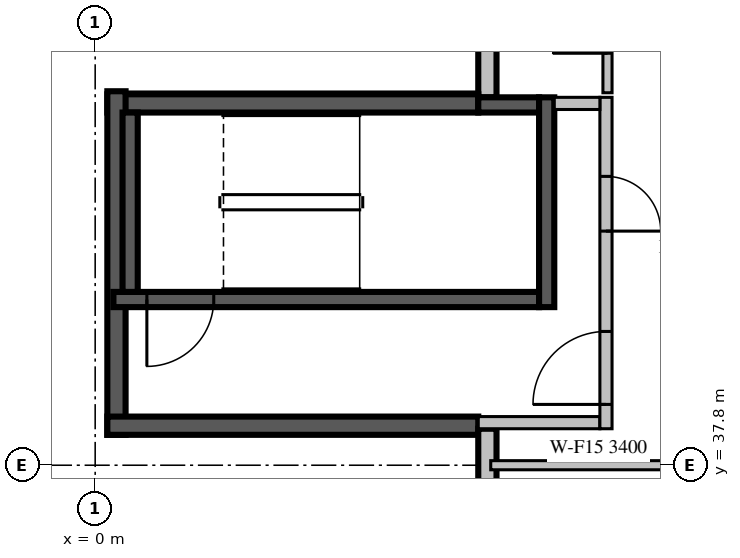
"""IFC4 building model, lengths in metres.
Left out: names, types, materials, properties, quantities, classifications, styles, units other than length and angle.
Written with IfcOpenShell. Run it as: python <this file> out.ifc"""

import sys

from ifc_helpers import new_model, si_unit, direction, frame, frame_2d, origin, place, context, subcontext, project, spatial, rectangle, extrude, source, transform, mapped, element, fill, save


model = new_model("IFC4")
c1 = context("Model", 3, precision=1e-05, world=origin(), true_north=direction((0.0, 1.0)))
c2 = subcontext(c1, "Body", "Model", "MODEL_VIEW")
j1 = project(units=[si_unit("LENGTHUNIT", "METRE"), si_unit("PLANEANGLEUNIT", "RADIAN")], contexts=[c1])
p1 = place(None, origin())
s1 = spatial("IfcSite", under=j1, at=p1, CompositionType="ELEMENT")
p2 = place(p1, origin())
s2 = spatial("IfcBuilding", under=s1, at=p2, CompositionType="ELEMENT")
p3 = place(p2, frame((0.0, 0.0, 200.6)))
s3 = spatial("IfcBuildingStorey", under=s2, at=p3, CompositionType="ELEMENT", Elevation=200.6)
m1 = source(origin(), c2, "Body", "SweptSolid", [
    extrude(rectangle(XDim=9.91, YDim=0.3, at=frame_2d((4.955, 0.0))), origin(), (0.0, 0.0, 1.0), 3.4),
])
p4 = place(p3, frame((6.45, 53.76, 0.0), z_axis=(0.0, 0.0, 1.0), x_axis=(0.0, -1.0, 0.0)))
e1 = element("IfcWall", 1, at=p4, inside=s3, PredefinedType="STANDARD", context=c2, shape_type="MappedRepresentation", body=[
    mapped(m1, transform((0.0, 0.0, 0.0), scale=1.0)),
])
m2 = source(origin(), c2, "Body", "SweptSolid", [
    extrude(rectangle(XDim=2.4, YDim=2.3, at=frame_2d((1.2, 1.15))), frame((0.0, 0.16, 0.0), z_axis=(0.0, -1.0, 0.0), x_axis=(1.0, 0.0, 0.0)), (0.0, 0.0, 1.0), 0.32),
])
p5 = place(p4, frame((4.272, 0.0, 0.6)))
e2 = element("IfcOpeningElement", 2, at=p5, cuts=e1, PredefinedType="OPENING", context=c2, shape_type="MappedRepresentation", body=[
    mapped(m2, transform((0.0, 0.0, 0.0), scale=1.0)),
])
p6 = place(p4, frame((0.936, 0.0, 0.6)))
e3 = element("IfcOpeningElement", 3, at=p6, cuts=e1, PredefinedType="OPENING", context=c2, shape_type="MappedRepresentation", body=[
    mapped(m2, transform((0.0, 0.0, 0.0), scale=1.0)),
])
m3 = source(origin(), c2, "Body", "SweptSolid", [
    extrude(rectangle(XDim=6.1, YDim=0.3, at=frame_2d((3.05, 0.0))), origin(), (0.0, 0.0, 1.0), 3.4),
])
p7 = place(p3, frame((6.3, 43.75, 0.0), z_axis=(0.0, 0.0, 1.0), x_axis=(-1.0, 0.0, 0.0)))
e4 = element("IfcWall", 4, at=p7, inside=s3, PredefinedType="SOLIDWALL", context=c2, shape_type="MappedRepresentation", body=[
    mapped(m3, transform((0.0, 0.0, 0.0), scale=1.0)),
])
m4 = source(origin(), c2, "Body", "SweptSolid", [
    extrude(rectangle(XDim=5.65, YDim=0.3, at=frame_2d((2.825, 0.0))), origin(), (0.0, 0.0, 1.0), 3.4),
])
p8 = place(p3, frame((0.35, 43.95, 0.0), z_axis=(0.0, 0.0, 1.0), x_axis=(0.0, -1.0, 0.0)))
e5 = element("IfcWall", 5, at=p8, inside=s3, PredefinedType="SOLIDWALL", context=c2, shape_type="MappedRepresentation", body=[
    mapped(m4, transform((0.0, 0.0, 0.0), scale=1.0)),
])
p9 = place(p3, frame((0.2, 38.45, 0.0), z_axis=(0.0, 0.0, 1.0), x_axis=(1.0, 0.0, 0.0)))
e6 = element("IfcWall", 6, at=p9, inside=s3, PredefinedType="SOLIDWALL", context=c2, shape_type="MappedRepresentation", body=[
    mapped(m3, transform((0.0, 0.0, 0.0), scale=1.0)),
])
m5 = source(origin(), c2, "Body", "SweptSolid", [
    extrude(rectangle(XDim=16.6, YDim=0.3, at=frame_2d((8.3, 0.0))), origin(), (0.0, 0.0, 1.0), 3.4),
])
p10 = place(p3, frame((6.45, 38.4, 0.0), z_axis=(0.0, 0.0, 1.0), x_axis=(0.0, -1.0, 0.0)))
e7 = element("IfcWall", 7, at=p10, inside=s3, PredefinedType="STANDARD", context=c2, shape_type="MappedRepresentation", body=[
    mapped(m5, transform((0.0, 0.0, 0.0), scale=1.0)),
])
m6 = source(origin(), c2, "Body", "SweptSolid", [
    extrude(rectangle(XDim=1.8, YDim=2.3, at=frame_2d((0.9, 1.15))), frame((0.0, 0.16, 0.0), z_axis=(0.0, -1.0, 0.0), x_axis=(1.0, 0.0, 0.0)), (0.0, 0.0, 1.0), 0.32),
])
p11 = place(p10, frame((1.15, 0.0, 0.6)))
e8 = element("IfcOpeningElement", 8, at=p11, cuts=e7, PredefinedType="OPENING", context=c2, shape_type="MappedRepresentation", body=[
    mapped(m6, transform((0.0, 0.0, 0.0), scale=1.0)),
])
p12 = place(p10, frame((9.438, 0.0, 0.6)))
e9 = element("IfcOpeningElement", 9, at=p12, cuts=e7, PredefinedType="OPENING", context=c2, shape_type="MappedRepresentation", body=[
    mapped(m6, transform((0.0, 0.0, 0.0), scale=1.0)),
])
m7 = source(origin(), c2, "Body", "SweptSolid", [
    extrude(rectangle(XDim=1.2, YDim=2.3, at=frame_2d((0.6, 1.15))), frame((0.0, 0.16, 0.0), z_axis=(0.0, -1.0, 0.0), x_axis=(1.0, 0.0, 0.0)), (0.0, 0.0, 1.0), 0.32),
])
p13 = place(p10, frame((14.338, 0.0, 0.6)))
e10 = element("IfcOpeningElement", 10, at=p13, cuts=e7, PredefinedType="OPENING", context=c2, shape_type="MappedRepresentation", body=[
    mapped(m7, transform((0.0, 0.0, 0.0), scale=1.0)),
])
p14 = place(p10, frame((11.887, 0.0, 0.6)))
e11 = element("IfcOpeningElement", 11, at=p14, cuts=e7, PredefinedType="OPENING", context=c2, shape_type="MappedRepresentation", body=[
    mapped(m6, transform((0.0, 0.0, 0.0), scale=1.0)),
])
m8 = source(origin(), c2, "Body", "SweptSolid", [
    extrude(rectangle(XDim=1.0, YDim=2.1, at=frame_2d((0.5, 1.05))), frame((0.0, 0.16, 0.0), z_axis=(0.0, -1.0, 0.0), x_axis=(1.0, 0.0, 0.0)), (0.0, 0.0, 1.0), 0.32),
])
p15 = place(p10, frame((5.908, 0.0, 0.0)))
e12 = element("IfcOpeningElement", 12, at=p15, cuts=e7, PredefinedType="OPENING", context=c2, shape_type="MappedRepresentation", body=[
    mapped(m8, transform((0.0, 0.0, 0.0), scale=1.0)),
])
m9 = source(origin(), c2, "Body", "SweptSolid", [
    extrude(rectangle(XDim=7.0, YDim=0.25, at=frame_2d((3.5, 0.0))), origin(), (0.0, 0.0, 1.0), 3.4),
])
p16 = place(p3, frame((0.3, 40.525, 0.0), z_axis=(0.0, 0.0, 1.0), x_axis=(1.0, 0.0, 0.0)))
e13 = element("IfcWall", 13, at=p16, inside=s3, PredefinedType="SOLIDWALL", context=c2, shape_type="MappedRepresentation", body=[
    mapped(m9, transform((0.0, 0.0, 0.0), scale=1.0)),
])
m10 = source(origin(), c2, "Body", "SweptSolid", [
    extrude(rectangle(XDim=1.1, YDim=2.1, at=frame_2d((0.55, 1.05))), frame((0.0, 0.135, 0.0), z_axis=(0.0, -1.0, 0.0), x_axis=(1.0, 0.0, 0.0)), (0.0, 0.0, 1.0), 0.27),
])
p17 = place(p16, frame((0.55, 0.0, 0.0)))
e14 = element("IfcOpeningElement", 14, at=p17, cuts=e13, PredefinedType="OPENING", context=c2, shape_type="MappedRepresentation", body=[
    mapped(m10, transform((0.0, 0.0, 0.0), scale=1.0)),
])
m11 = source(origin(), c2, "Body", "SweptSolid", [
    extrude(rectangle(XDim=1.0, YDim=0.25, at=frame_2d((0.5, 0.0))), origin(), (0.0, 0.0, 1.0), 3.4),
])
p18 = place(p3, frame((6.3, 43.725, 0.0), z_axis=(0.0, 0.0, 1.0), x_axis=(1.0, 0.0, 0.0)))
e15 = element("IfcWall", 15, at=p18, inside=s3, PredefinedType="SOLIDWALL", context=c2, shape_type="MappedRepresentation", body=[
    mapped(m11, transform((0.0, 0.0, 0.0), scale=1.0)),
])
m12 = source(origin(), c2, "Body", "SweptSolid", [
    extrude(rectangle(XDim=3.45, YDim=0.25, at=frame_2d((1.725, 0.0))), origin(), (0.0, 0.0, 1.0), 3.4),
])
p19 = place(p3, frame((7.425, 40.4, 0.0), z_axis=(0.0, 0.0, 1.0), x_axis=(0.0, 1.0, 0.0)))
e16 = element("IfcWall", 16, at=p19, inside=s3, PredefinedType="SOLIDWALL", context=c2, shape_type="MappedRepresentation", body=[
    mapped(m12, transform((0.0, 0.0, 0.0), scale=1.0)),
])
m13 = source(origin(), c2, "Body", "SweptSolid", [
    extrude(rectangle(XDim=2.95, YDim=0.25, at=frame_2d((1.475, 0.0))), origin(), (0.0, 0.0, 1.0), 3.4),
])
p20 = place(p3, frame((0.575, 40.65, 0.0), z_axis=(0.0, 0.0, 1.0), x_axis=(0.0, 1.0, 0.0)))
e17 = element("IfcWall", 17, at=p20, inside=s3, PredefinedType="SOLIDWALL", context=c2, shape_type="MappedRepresentation", body=[
    mapped(m13, transform((0.0, 0.0, 0.0), scale=1.0)),
])
m14 = source(origin(), c2, "Body", "SweptSolid", [
    extrude(rectangle(XDim=2.0, YDim=0.2, at=frame_2d((1.0, 0.0))), origin(), (0.0, 0.0, 1.0), 3.4),
])
p21 = place(p3, frame((6.3, 38.5, 0.0), z_axis=(0.0, 0.0, 1.0), x_axis=(1.0, 0.0, 0.0)))
e18 = element("IfcWall", 18, at=p21, inside=s3, PredefinedType="PARTITIONING", context=c2, shape_type="MappedRepresentation", body=[
    mapped(m14, transform((0.0, 0.0, 0.0), scale=1.0)),
])
m15 = source(origin(), c2, "Body", "SweptSolid", [
    extrude(rectangle(XDim=5.45, YDim=0.2, at=frame_2d((2.725, 0.0))), origin(), (0.0, 0.0, 1.0), 3.4),
])
p22 = place(p3, frame((8.4, 38.4, 0.0), z_axis=(0.0, 0.0, 1.0), x_axis=(0.0, 1.0, 0.0)))
e19 = element("IfcWall", 19, at=p22, inside=s3, PredefinedType="PARTITIONING", context=c2, shape_type="MappedRepresentation", body=[
    mapped(m15, transform((0.0, 0.0, 0.0), scale=1.0)),
])
m16 = source(origin(), c2, "Body", "SweptSolid", [
    extrude(rectangle(XDim=1.2, YDim=2.1, at=frame_2d((0.6, 1.05))), frame((0.0, 0.11, 0.0), z_axis=(0.0, -1.0, 0.0), x_axis=(1.0, 0.0, 0.0)), (0.0, 0.0, 1.0), 0.22),
])
p23 = place(p22, frame((0.4, 0.0, 0.0)))
e20 = element("IfcOpeningElement", 20, at=p23, cuts=e19, PredefinedType="OPENING", context=c2, shape_type="MappedRepresentation", body=[
    mapped(m16, transform((0.0, 0.0, 0.0), scale=1.0)),
])
m17 = source(origin(), c2, "Body", "SweptSolid", [
    extrude(rectangle(XDim=0.9, YDim=2.1, at=frame_2d((0.45, 1.05))), frame((0.0, 0.11, 0.0), z_axis=(0.0, -1.0, 0.0), x_axis=(1.0, 0.0, 0.0)), (0.0, 0.0, 1.0), 0.22),
])
p24 = place(p22, frame((3.25, 0.0, 0.0)))
e21 = element("IfcOpeningElement", 21, at=p24, cuts=e19, PredefinedType="OPENING", context=c2, shape_type="MappedRepresentation", body=[
    mapped(m17, transform((0.0, 0.0, 0.0), scale=1.0)),
])
m18 = source(origin(), c2, "Body", "SweptSolid", [
    extrude(rectangle(XDim=0.75, YDim=0.2, at=frame_2d((0.375, 0.0))), origin(), (0.0, 0.0, 1.0), 3.4),
])
p25 = place(p3, frame((7.55, 43.75, 0.0), z_axis=(0.0, 0.0, 1.0), x_axis=(1.0, 0.0, 0.0)))
e22 = element("IfcWall", 22, at=p25, inside=s3, PredefinedType="PARTITIONING", context=c2, shape_type="MappedRepresentation", body=[
    mapped(m18, transform((0.0, 0.0, 0.0), scale=1.0)),
])
m19 = source(origin(), c2, "Body", "SweptSolid", [
    extrude(rectangle(XDim=2.2, YDim=0.15, at=frame_2d((1.1, 0.0))), origin(), (0.0, 0.0, 1.0), 3.4),
])
p26 = place(p3, frame((8.425, 43.925, 0.0), z_axis=(0.0, 0.0, 1.0), x_axis=(0.0, 1.0, 0.0)))
e23 = element("IfcWall", 23, at=p26, inside=s3, PredefinedType="PARTITIONING", context=c2, shape_type="MappedRepresentation", body=[
    mapped(m19, transform((0.0, 0.0, 0.0), scale=1.0)),
])
m20 = source(origin(), c2, "Body", "SweptSolid", [
    extrude(rectangle(XDim=0.9, YDim=2.1, at=frame_2d((0.45, 1.05))), frame((0.0, 0.085, 0.0), z_axis=(0.0, -1.0, 0.0), x_axis=(1.0, 0.0, 0.0)), (0.0, 0.0, 1.0), 0.17),
])
p27 = place(p26, frame((0.65, 0.0, 0.0)))
e24 = element("IfcOpeningElement", 24, at=p27, cuts=e23, PredefinedType="OPENING", context=c2, shape_type="MappedRepresentation", body=[
    mapped(m20, transform((0.0, 0.0, 0.0), scale=1.0)),
])
m21 = source(origin(), c2, "Body", "SweptSolid", [
    extrude(rectangle(XDim=3.546, YDim=0.15, at=frame_2d((1.773, 0.0))), origin(), (0.0, 0.0, 1.0), 3.4),
])
p28 = place(p3, frame((10.051, 37.8, 0.0), z_axis=(0.0, 0.0, 1.0), x_axis=(-1.0, 0.0, 0.0)))
e25 = element("IfcWall", 25, at=p28, inside=s3, PredefinedType="PARTITIONING", context=c2, shape_type="MappedRepresentation", body=[
    mapped(m21, transform((0.0, 0.0, 0.0), scale=1.0)),
])
m22 = source(origin(), c2, "Body", "SweptSolid", [
    extrude(rectangle(XDim=1.1, YDim=2.1, at=frame_2d((0.55, 1.05))), frame((0.0, 0.025, 0.0), z_axis=(0.0, -1.0, 0.0), x_axis=(1.0, 0.0, 0.0)), (0.0, 0.0, 1.0), 0.05),
])
p29 = place(p17, origin())
e26 = element("IfcDoor", 26, at=p29, inside=s3, OperationType="SINGLE_SWING_RIGHT", PredefinedType="DOOR", context=c2, shape_type="MappedRepresentation", body=[
    mapped(m22, transform((0.0, 0.0, 0.0), scale=1.0)),
])
fill(e14, e26)
m23 = source(origin(), c2, "Body", "SweptSolid", [
    extrude(rectangle(XDim=1.2, YDim=2.1, at=frame_2d((0.6, 1.05))), frame((0.0, 0.025, 0.0), z_axis=(0.0, -1.0, 0.0), x_axis=(1.0, 0.0, 0.0)), (0.0, 0.0, 1.0), 0.05),
])
p30 = place(p23, origin())
e27 = element("IfcDoor", 27, at=p30, inside=s3, OperationType="SINGLE_SWING_LEFT", PredefinedType="DOOR", context=c2, shape_type="MappedRepresentation", body=[
    mapped(m23, transform((0.0, 0.0, 0.0), scale=1.0)),
])
fill(e20, e27)
m24 = source(origin(), c2, "Body", "SweptSolid", [
    extrude(rectangle(XDim=0.9, YDim=2.1, at=frame_2d((0.45, 1.05))), frame((0.0, 0.025, 0.0), z_axis=(0.0, -1.0, 0.0), x_axis=(1.0, 0.0, 0.0)), (0.0, 0.0, 1.0), 0.05),
])
p31 = place(p24, origin())
e28 = element("IfcDoor", 28, at=p31, inside=s3, OperationType="SINGLE_SWING_RIGHT", PredefinedType="DOOR", context=c2, shape_type="MappedRepresentation", body=[
    mapped(m24, transform((0.0, 0.0, 0.0), scale=1.0)),
])
fill(e21, e28)
p32 = place(p27, origin())
e29 = element("IfcDoor", 29, at=p32, inside=s3, OperationType="SINGLE_SWING_LEFT", PredefinedType="DOOR", context=c2, shape_type="MappedRepresentation", body=[
    mapped(m24, transform((0.0, 0.0, 0.0), scale=1.0)),
])
fill(e24, e29)
save(model, sys.argv[1])
